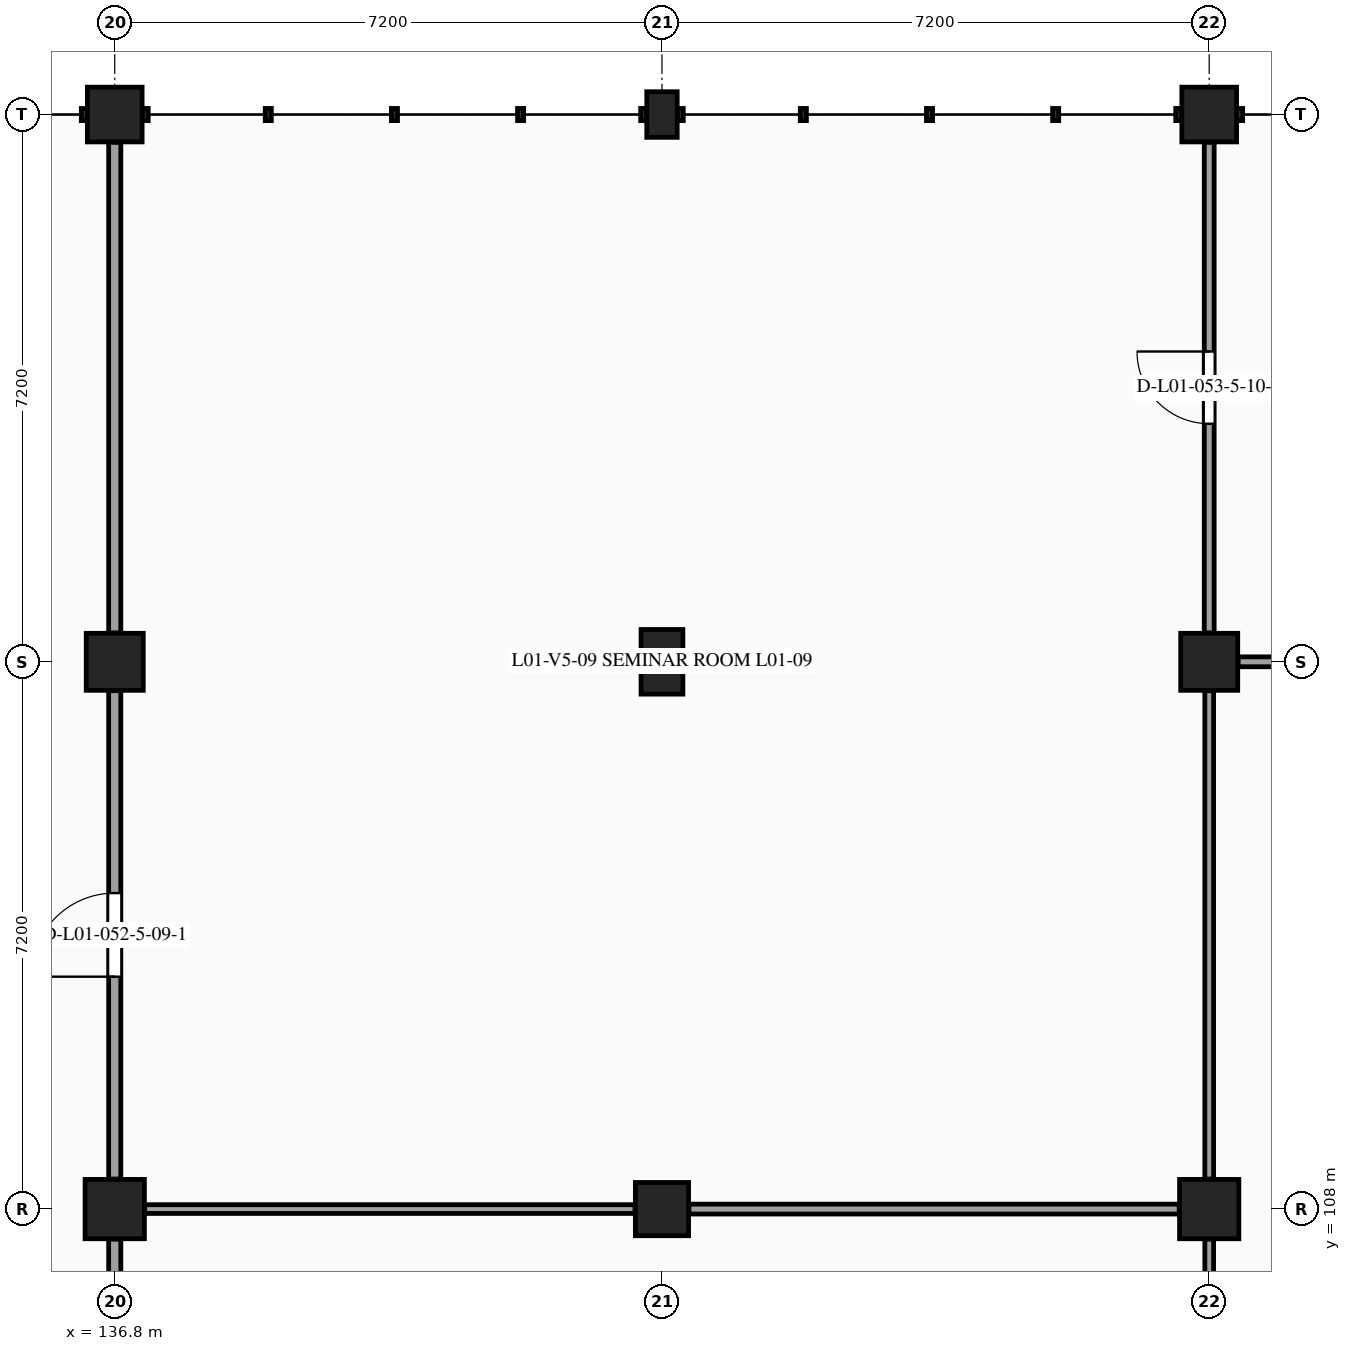
"""IFC4 building model, lengths in metres.
Left out: names, types, materials, properties, quantities, classifications, styles, units other than length and angle.
Written with IfcOpenShell. Run it as: python <this file> out.ifc"""

import sys

from ifc_helpers import new_model, si_unit, direction, frame, frame_2d, origin, origin_2d, place, context, subcontext, project, spatial, rectangle, extrude, element, fill, save


model = new_model("IFC4")
c1 = context("Model", 3, precision=1e-05, world=origin(), true_north=direction((0.0, 1.0)))
c2 = subcontext(c1, "Body", "Model", "MODEL_VIEW")
j1 = project(units=[si_unit("LENGTHUNIT", "METRE"), si_unit("PLANEANGLEUNIT", "RADIAN")], contexts=[c1])
p1 = place(None, origin())
s1 = spatial("IfcSite", under=j1, at=p1, CompositionType="ELEMENT")
p2 = place(p1, origin())
s2 = spatial("IfcBuilding", under=s1, at=p2, CompositionType="ELEMENT")
p3 = place(p2, frame((0.0, 0.0, 5.4)))
s3 = spatial("IfcBuildingStorey", under=s2, at=p3, CompositionType="ELEMENT", Elevation=5.4)
p4 = place(p3, frame((136.8, 108.0, 0.0), z_axis=(0.0, 0.0, 1.0), x_axis=(1.0, 0.0, 0.0)))
e1 = element("IfcColumn", 1, at=p4, inside=s3, PredefinedType="COLUMN", context=c2, shape_type="SweptSolid", body=[
    extrude(rectangle(XDim=0.78, YDim=0.78, at=origin_2d()), origin(), (0.0, 0.0, 1.0), 4.5),
])
p5 = place(p3, frame((136.8, 115.2, 0.0), z_axis=(0.0, 0.0, 1.0), x_axis=(1.0, 0.0, 0.0)))
e2 = element("IfcColumn", 2, at=p5, inside=s3, PredefinedType="COLUMN", context=c2, shape_type="SweptSolid", body=[
    extrude(rectangle(XDim=0.75, YDim=0.75, at=origin_2d()), origin(), (0.0, 0.0, 1.0), 4.5),
])
p6 = place(p3, frame((136.8, 122.4, 0.0), z_axis=(0.0, 0.0, 1.0), x_axis=(1.0, 0.0, 0.0)))
e3 = element("IfcColumn", 3, at=p6, inside=s3, PredefinedType="COLUMN", context=c2, shape_type="SweptSolid", body=[
    extrude(rectangle(XDim=0.72, YDim=0.72, at=origin_2d()), origin(), (0.0, 0.0, 1.0), 4.5),
])
p7 = place(p3, frame((144.0, 108.0, 0.0), z_axis=(0.0, 0.0, 1.0), x_axis=(1.0, 0.0, 0.0)))
e4 = element("IfcColumn", 4, at=p7, inside=s3, PredefinedType="COLUMN", context=c2, shape_type="SweptSolid", body=[
    extrude(rectangle(XDim=0.7, YDim=0.7, at=origin_2d()), origin(), (0.0, 0.0, 1.0), 4.5),
])
p8 = place(p3, frame((144.0, 115.2, 0.0), z_axis=(0.0, 0.0, 1.0), x_axis=(1.0, 0.0, 0.0)))
e5 = element("IfcColumn", 5, at=p8, inside=s3, PredefinedType="COLUMN", context=c2, shape_type="SweptSolid", body=[
    extrude(rectangle(XDim=0.55, YDim=0.85, at=origin_2d()), origin(), (0.0, 0.0, 1.0), 4.5),
])
p9 = place(p3, frame((144.0, 122.4, 0.0), z_axis=(0.0, 0.0, 1.0), x_axis=(1.0, 0.0, 0.0)))
e6 = element("IfcColumn", 6, at=p9, inside=s3, PredefinedType="PILASTER", context=c2, shape_type="SweptSolid", body=[
    extrude(rectangle(XDim=0.4, YDim=0.6, at=origin_2d()), origin(), (0.0, 0.0, 1.0), 4.5),
])
p10 = place(p3, frame((151.2, 108.0, 0.0), z_axis=(0.0, 0.0, 1.0), x_axis=(1.0, 0.0, 0.0)))
e7 = element("IfcColumn", 7, at=p10, inside=s3, PredefinedType="COLUMN", context=c2, shape_type="SweptSolid", body=[
    extrude(rectangle(XDim=0.78, YDim=0.78, at=origin_2d()), origin(), (0.0, 0.0, 1.0), 4.5),
])
p11 = place(p3, frame((151.2, 115.2, 0.0), z_axis=(0.0, 0.0, 1.0), x_axis=(1.0, 0.0, 0.0)))
e8 = element("IfcColumn", 8, at=p11, inside=s3, PredefinedType="COLUMN", context=c2, shape_type="SweptSolid", body=[
    extrude(rectangle(XDim=0.75, YDim=0.75, at=origin_2d()), origin(), (0.0, 0.0, 1.0), 4.5),
])
p12 = place(p3, frame((151.2, 122.4, 0.0), z_axis=(0.0, 0.0, 1.0), x_axis=(1.0, 0.0, 0.0)))
e9 = element("IfcColumn", 9, at=p12, inside=s3, PredefinedType="COLUMN", context=c2, shape_type="SweptSolid", body=[
    extrude(rectangle(XDim=0.72, YDim=0.72, at=origin_2d()), origin(), (0.0, 0.0, 1.0), 4.5),
])
p13 = place(p3, frame((136.8, 101.105, 0.0), z_axis=(0.0, 0.0, 1.0), x_axis=(0.0, 1.0, 0.0)))
e10 = element("IfcWall", 10, at=p13, inside=s3, PredefinedType="PARTITIONING", context=c2, shape_type="SweptSolid", body=[
    extrude(rectangle(XDim=6.5, YDim=0.16, at=frame_2d((3.25, 0.0))), origin(), (0.0, 0.0, 1.0), 3.525),
])
p14 = place(p3, frame((136.8, 108.395, 0.0), z_axis=(0.0, 0.0, 1.0), x_axis=(0.0, 1.0, 0.0)))
e11 = element("IfcWall", 11, at=p14, inside=s3, PredefinedType="PARTITIONING", context=c2, shape_type="SweptSolid", body=[
    extrude(rectangle(XDim=6.425, YDim=0.16, at=frame_2d((3.212, 0.0))), origin(), (0.0, 0.0, 1.0), 3.525),
])
p15 = place(p14, frame((2.663, 0.0, 0.0)))
e12 = element("IfcOpeningElement", 12, at=p15, cuts=e11, PredefinedType="OPENING", context=c2, shape_type="SweptSolid", body=[
    extrude(rectangle(XDim=1.1, YDim=2.15, at=frame_2d((0.55, 1.075))), frame((0.0, 0.09, 0.0), z_axis=(0.0, -1.0, 0.0), x_axis=(1.0, 0.0, 0.0)), (0.0, 0.0, 1.0), 0.18),
])
p16 = place(p3, frame((136.8, 115.58, 0.0), z_axis=(0.0, 0.0, 1.0), x_axis=(0.0, 1.0, 0.0)))
e13 = element("IfcWall", 13, at=p16, inside=s3, PredefinedType="PARTITIONING", context=c2, shape_type="SweptSolid", body=[
    extrude(rectangle(XDim=6.455, YDim=0.16, at=frame_2d((3.228, 0.0))), origin(), (0.0, 0.0, 1.0), 3.52),
])
p17 = place(p3, frame((137.195, 108.0, 0.0), z_axis=(0.0, 0.0, 1.0), x_axis=(1.0, 0.0, 0.0)))
e14 = element("IfcWall", 14, at=p17, inside=s3, PredefinedType="PARTITIONING", context=c2, shape_type="SweptSolid", body=[
    extrude(rectangle(XDim=6.45, YDim=0.115, at=frame_2d((3.225, 0.0))), origin(), (0.0, 0.0, 1.0), 3.43),
])
p18 = place(p3, frame((151.2, 101.105, 0.0), z_axis=(0.0, 0.0, 1.0), x_axis=(0.0, 1.0, 0.0)))
e15 = element("IfcWall", 15, at=p18, inside=s3, PredefinedType="PARTITIONING", context=c2, shape_type="SweptSolid", body=[
    extrude(rectangle(XDim=6.5, YDim=0.115, at=frame_2d((3.25, 0.0))), origin(), (0.0, 0.0, 1.0), 3.525),
])
p19 = place(p18, frame((2.61, 0.0, 0.0)))
e16 = element("IfcOpeningElement", 16, at=p19, cuts=e15, PredefinedType="OPENING", context=c2, shape_type="SweptSolid", body=[
    extrude(rectangle(XDim=1.28, YDim=2.24, at=frame_2d((0.64, 1.12))), frame((0.0, 0.067, 0.0), z_axis=(0.0, -1.0, 0.0), x_axis=(1.0, 0.0, 0.0)), (0.0, 0.0, 1.0), 0.135),
])
p20 = place(p3, frame((144.355, 108.0, 0.0), z_axis=(0.0, 0.0, 1.0), x_axis=(1.0, 0.0, 0.0)))
e17 = element("IfcWall", 17, at=p20, inside=s3, PredefinedType="PARTITIONING", context=c2, shape_type="SweptSolid", body=[
    extrude(rectangle(XDim=6.45, YDim=0.13, at=frame_2d((3.225, 0.0))), origin(), (0.0, 0.0, 1.0), 3.46),
])
p21 = place(p3, frame((151.2, 108.395, 0.0), z_axis=(0.0, 0.0, 1.0), x_axis=(0.0, 1.0, 0.0)))
e18 = element("IfcWall", 18, at=p21, inside=s3, PredefinedType="PARTITIONING", context=c2, shape_type="SweptSolid", body=[
    extrude(rectangle(XDim=6.425, YDim=0.115, at=frame_2d((3.212, 0.0))), origin(), (0.0, 0.0, 1.0), 3.525),
])
p22 = place(p3, frame((151.2, 115.58, 0.0), z_axis=(0.0, 0.0, 1.0), x_axis=(0.0, 1.0, 0.0)))
e19 = element("IfcWall", 19, at=p22, inside=s3, PredefinedType="PARTITIONING", context=c2, shape_type="SweptSolid", body=[
    extrude(rectangle(XDim=6.455, YDim=0.13, at=frame_2d((3.228, 0.0))), origin(), (0.0, 0.0, 1.0), 3.52),
])
p23 = place(p22, frame((2.752, 0.0, 0.0)))
e20 = element("IfcOpeningElement", 20, at=p23, cuts=e19, PredefinedType="OPENING", context=c2, shape_type="SweptSolid", body=[
    extrude(rectangle(XDim=0.95, YDim=2.15, at=frame_2d((0.475, 1.075))), frame((0.0, 0.075, 0.0), z_axis=(0.0, -1.0, 0.0), x_axis=(1.0, 0.0, 0.0)), (0.0, 0.0, 1.0), 0.15),
])
p24 = place(p3, frame((151.58, 115.2, 0.0), z_axis=(0.0, 0.0, 1.0), x_axis=(1.0, 0.0, 0.0)))
e21 = element("IfcWall", 21, at=p24, inside=s3, PredefinedType="PARTITIONING", context=c2, shape_type="SweptSolid", body=[
    extrude(rectangle(XDim=6.54, YDim=0.13, at=frame_2d((3.27, 0.0))), origin(), (0.0, 0.0, 1.0), 3.47),
])
p25 = place(p15, origin())
e22 = element("IfcDoor", 22, at=p25, inside=s3, OperationType="SINGLE_SWING_LEFT", PredefinedType="DOOR", context=c2, shape_type="SweptSolid", body=[
    extrude(rectangle(XDim=1.1, YDim=2.15, at=frame_2d((0.55, 1.075))), frame((0.0, 0.025, 0.0), z_axis=(0.0, -1.0, 0.0), x_axis=(1.0, 0.0, 0.0)), (0.0, 0.0, 1.0), 0.05),
])
fill(e12, e22)
p26 = place(p23, origin())
e23 = element("IfcDoor", 23, at=p26, inside=s3, OperationType="SINGLE_SWING_RIGHT", PredefinedType="DOOR", context=c2, shape_type="SweptSolid", body=[
    extrude(rectangle(XDim=0.95, YDim=2.15, at=frame_2d((0.475, 1.075))), frame((0.0, 0.025, 0.0), z_axis=(0.0, -1.0, 0.0), x_axis=(1.0, 0.0, 0.0)), (0.0, 0.0, 1.0), 0.05),
])
fill(e20, e23)
save(model, sys.argv[1])
